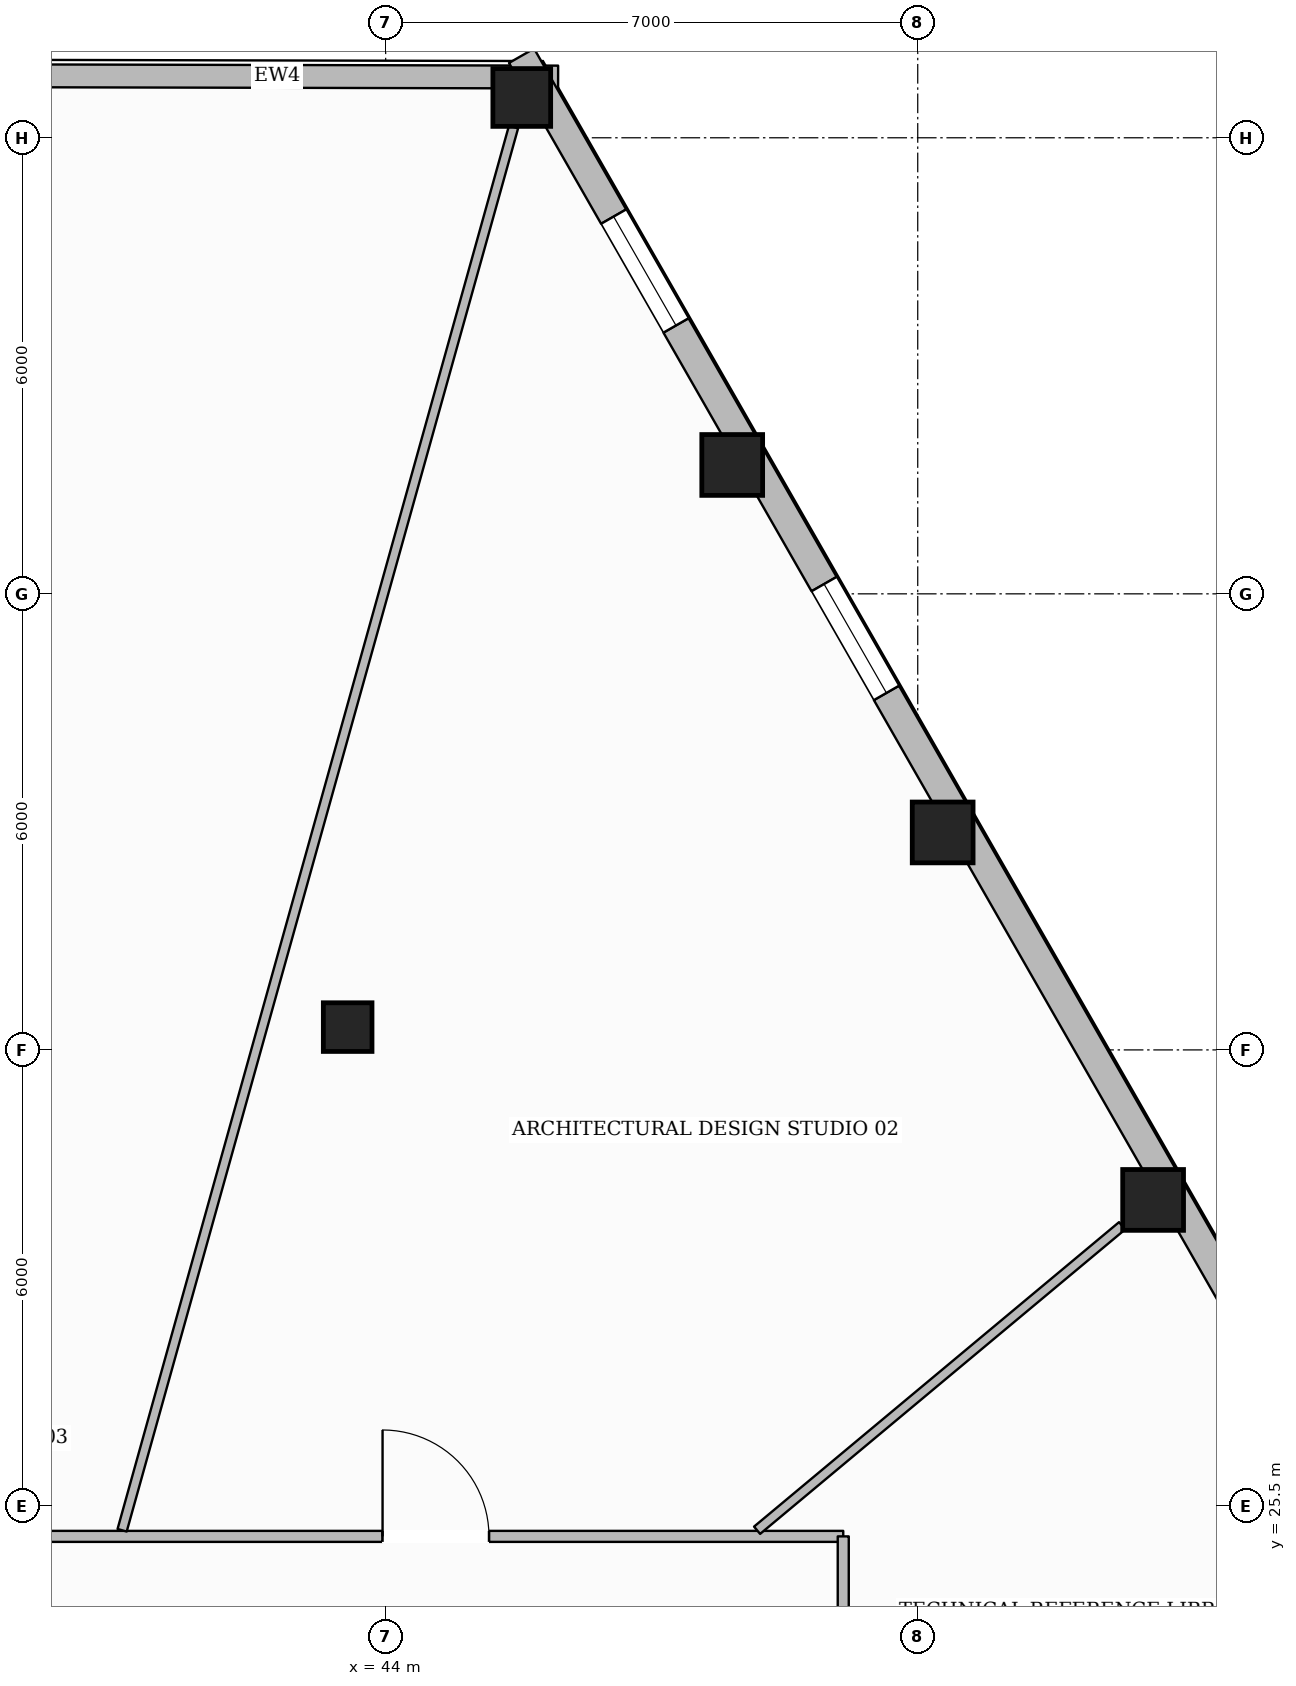
"""IFC4 building model, lengths in metres.
Left out: names, types, materials, properties, quantities, classifications, styles, units other than length and angle.
Written with IfcOpenShell. Run it as: python <this file> out.ifc"""

import sys

from ifc_helpers import new_model, si_unit, direction, frame, frame_2d, origin, origin_2d, place, context, subcontext, project, spatial, rectangle, hollow_rectangle, extrude, element, fill, save


model = new_model("IFC4")
c1 = context("Model", 3, precision=1e-05, world=origin(), true_north=direction((0.0, 1.0)))
c2 = subcontext(c1, "Body", "Model", "MODEL_VIEW")
j1 = project(units=[si_unit("LENGTHUNIT", "METRE"), si_unit("PLANEANGLEUNIT", "RADIAN")], contexts=[c1])
p1 = place(None, origin())
s1 = spatial("IfcSite", under=j1, at=p1, CompositionType="ELEMENT")
p2 = place(p1, origin())
s2 = spatial("IfcBuilding", under=s1, at=p2, CompositionType="ELEMENT")
p3 = place(p2, frame((0.0, 0.0, 32.95)))
s3 = spatial("IfcBuildingStorey", under=s2, at=p3, CompositionType="ELEMENT", Elevation=32.95)
for number, where, z_axis, x_axis in (
    (1, (54.097, 29.526, 0.0), (0.0, 0.0, 1.0), (1.0, 0.0, 0.0)),
    (2, (51.328, 34.361, 0.0), (0.0, 0.0, 1.0), (1.0, 0.0, 0.0)),
    (3, (48.559, 39.196, 0.0), (0.0, 0.0, 1.0), (1.0, 0.0, 0.0)),
):
    element("IfcColumn", number, at=place(p3, frame(where, z_axis=z_axis, x_axis=x_axis)), inside=s3, PredefinedType="COLUMN", context=c2, shape_type="SweptSolid", body=[
        extrude(hollow_rectangle(XDim=0.8, YDim=0.8, WallThickness=0.036, at=origin_2d()), origin(), (0.0, 0.0, 1.0), 3.59),
    ])
p4 = place(p3, frame((45.791, 44.03, 0.0), z_axis=(0.0, 0.0, 1.0), x_axis=(1.0, 0.0, 0.0)))
e4 = element("IfcColumn", 4, at=p4, inside=s3, PredefinedType="COLUMN", context=c2, shape_type="SweptSolid", body=[
    extrude(hollow_rectangle(XDim=0.76, YDim=0.76, WallThickness=0.035, at=origin_2d()), origin(), (0.0, 0.0, 1.0), 3.59),
])
p5 = place(p3, frame((43.5, 31.8, 0.0), z_axis=(0.0, 0.0, 1.0), x_axis=(1.0, 0.0, 0.0)))
e5 = element("IfcColumn", 5, at=p5, inside=s3, PredefinedType="COLUMN", context=c2, shape_type="SweptSolid", body=[
    extrude(hollow_rectangle(XDim=0.64, YDim=0.64, WallThickness=0.028, at=origin_2d()), origin(), (0.0, 0.0, 1.0), 3.59),
])
p6 = place(p3, frame((29.792, 44.336, 0.0), z_axis=(0.0, 0.0, 1.0), x_axis=(0.999997529995, -0.002222611864, 0.0)))
e6 = element("IfcWall", 6, at=p6, inside=s3, PredefinedType="STANDARD", context=c2, shape_type="SweptSolid", body=[
    extrude(rectangle(XDim=16.477, YDim=0.3, at=frame_2d((8.238, 0.0))), origin(), (0.0, 0.0, 1.0), 2.97),
])
p7 = place(p6, frame((7.638, 0.0, 0.65)))
e7 = element("IfcOpeningElement", 7, at=p7, cuts=e6, PredefinedType="OPENING", context=c2, shape_type="SweptSolid", body=[
    extrude(rectangle(XDim=1.2, YDim=1.7, at=frame_2d((0.6, 0.85))), frame((0.0, 0.16, 0.0), z_axis=(0.0, -1.0, 0.0), x_axis=(1.0, 0.0, 0.0)), (0.0, 0.0, 1.0), 0.32),
])
p8 = place(p3, frame((45.788, 44.579, 0.0), z_axis=(0.0, 0.0, 1.0), x_axis=(0.49695855075, -0.867774278736, 0.0)))
e8 = element("IfcWall", 8, at=p8, inside=s3, PredefinedType="STANDARD", context=c2, shape_type="SweptSolid", body=[
    extrude(rectangle(XDim=34.379, YDim=0.38, at=frame_2d((17.189, 0.0))), origin(), (0.0, 0.0, 1.0), 2.97),
])
p9 = place(p8, frame((25.184, 0.0, 0.0)))
e9 = element("IfcOpeningElement", 9, at=p9, cuts=e8, PredefinedType="OPENING", context=c2, shape_type="SweptSolid", body=[
    extrude(rectangle(XDim=1.0, YDim=2.2, at=frame_2d((0.5, 1.1))), frame((0.0, 0.2, 0.0), z_axis=(0.0, -1.0, 0.0), x_axis=(1.0, 0.0, 0.0)), (0.0, 0.0, 1.0), 0.4),
])
p10 = place(p8, frame((30.294, 0.0, 0.65)))
e10 = element("IfcOpeningElement", 10, at=p10, cuts=e8, PredefinedType="OPENING", context=c2, shape_type="SweptSolid", body=[
    extrude(rectangle(XDim=1.65, YDim=1.75, at=frame_2d((0.825, 0.875))), frame((0.0, 0.2, 0.0), z_axis=(0.0, -1.0, 0.0), x_axis=(1.0, 0.0, 0.0)), (0.0, 0.0, 1.0), 0.4),
])
p11 = place(p8, frame((19.152, 0.0, 0.65)))
e11 = element("IfcOpeningElement", 11, at=p11, cuts=e8, PredefinedType="OPENING", context=c2, shape_type="SweptSolid", body=[
    extrude(rectangle(XDim=1.65, YDim=1.75, at=frame_2d((0.825, 0.875))), frame((0.0, 0.2, 0.0), z_axis=(0.0, -1.0, 0.0), x_axis=(1.0, 0.0, 0.0)), (0.0, 0.0, 1.0), 0.4),
])
p12 = place(p8, frame((8.01, 0.0, 0.65)))
e12 = element("IfcOpeningElement", 12, at=p12, cuts=e8, PredefinedType="OPENING", context=c2, shape_type="SweptSolid", body=[
    extrude(rectangle(XDim=1.65, YDim=1.75, at=frame_2d((0.825, 0.875))), frame((0.0, 0.2, 0.0), z_axis=(0.0, -1.0, 0.0), x_axis=(1.0, 0.0, 0.0)), (0.0, 0.0, 1.0), 0.4),
])
p13 = place(p8, frame((2.438, 0.0, 0.65)))
e13 = element("IfcOpeningElement", 13, at=p13, cuts=e8, PredefinedType="OPENING", context=c2, shape_type="SweptSolid", body=[
    extrude(rectangle(XDim=1.65, YDim=1.75, at=frame_2d((0.825, 0.875))), frame((0.0, 0.2, 0.0), z_axis=(0.0, -1.0, 0.0), x_axis=(1.0, 0.0, 0.0)), (0.0, 0.0, 1.0), 0.4),
])
p14 = place(p3, frame((39.0, 25.1, 0.0), z_axis=(0.0, 0.0, 1.0), x_axis=(1.0, 0.0, 0.0)))
e14 = element("IfcWall", 14, at=p14, inside=s3, PredefinedType="PARTITIONING", context=c2, shape_type="SweptSolid", body=[
    extrude(rectangle(XDim=11.02, YDim=0.145, at=frame_2d((5.51, 0.0))), origin(), (0.0, 0.0, 1.0), 3.59),
])
p15 = place(p14, frame((4.959, 0.0, 0.0)))
e15 = element("IfcOpeningElement", 15, at=p15, cuts=e14, PredefinedType="OPENING", context=c2, shape_type="SweptSolid", body=[
    extrude(rectangle(XDim=1.4, YDim=2.2, at=frame_2d((0.7, 1.1))), frame((0.0, 0.083, 0.0), z_axis=(0.0, -1.0, 0.0), x_axis=(1.0, 0.0, 0.0)), (0.0, 0.0, 1.0), 0.165),
])
p16 = place(p3, frame((50.02, 25.1, 0.0), z_axis=(0.0, 0.0, 1.0), x_axis=(0.0, -1.0, 0.0)))
e16 = element("IfcWall", 16, at=p16, inside=s3, PredefinedType="PARTITIONING", context=c2, shape_type="SweptSolid", body=[
    extrude(rectangle(XDim=16.0, YDim=0.145, at=frame_2d((8.0, 0.0))), origin(), (0.0, 0.0, 1.0), 3.278),
])
p17 = place(p16, frame((2.834, 0.0, 0.0)))
e17 = element("IfcOpeningElement", 17, at=p17, cuts=e16, PredefinedType="OPENING", context=c2, shape_type="SweptSolid", body=[
    extrude(rectangle(XDim=1.4, YDim=2.2, at=frame_2d((0.7, 1.1))), frame((0.0, 0.083, 0.0), z_axis=(0.0, -1.0, 0.0), x_axis=(1.0, 0.0, 0.0)), (0.0, 0.0, 1.0), 0.165),
])
p18 = place(p16, frame((8.983, 0.0, 0.0)))
e18 = element("IfcOpeningElement", 18, at=p18, cuts=e16, PredefinedType="OPENING", context=c2, shape_type="SweptSolid", body=[
    extrude(rectangle(XDim=1.4, YDim=2.2, at=frame_2d((0.7, 1.1))), frame((0.0, 0.083, 0.0), z_axis=(0.0, -1.0, 0.0), x_axis=(1.0, 0.0, 0.0)), (0.0, 0.0, 1.0), 0.165),
])
p19 = place(p3, frame((48.886, 25.18, 0.0), z_axis=(0.0, 0.0, 1.0), x_axis=(0.767926794533, 0.640537616568, 0.0)))
e19 = element("IfcWall", 19, at=p19, inside=s3, PredefinedType="PARTITIONING", context=c2, shape_type="SweptSolid", body=[
    extrude(rectangle(XDim=6.253, YDim=0.125, at=frame_2d((3.127, 0.0))), origin(), (0.0, 0.0, 1.0), 3.057),
])
p20 = place(p3, frame((40.533, 25.18, 0.0), z_axis=(0.0, 0.0, 1.0), x_axis=(0.26868106489, 0.963229196697, 0.0)))
e20 = element("IfcWall", 20, at=p20, inside=s3, PredefinedType="PARTITIONING", context=c2, shape_type="SweptSolid", body=[
    extrude(rectangle(XDim=19.167, YDim=0.125, at=frame_2d((9.583, 0.0))), origin(), (0.0, 0.0, 1.0), 3.59),
])
p21 = place(p12, origin())
e21 = element("IfcWindow", 21, at=p21, inside=s3, PartitioningType="SINGLE_PANEL", PredefinedType="WINDOW", context=c2, shape_type="SweptSolid", body=[
    extrude(rectangle(XDim=1.65, YDim=1.75, at=frame_2d((0.825, 0.875))), frame((0.0, 0.03, 0.0), z_axis=(0.0, -1.0, 0.0), x_axis=(1.0, 0.0, 0.0)), (0.0, 0.0, 1.0), 0.06),
])
fill(e12, e21)
p22 = place(p13, origin())
e22 = element("IfcWindow", 22, at=p22, inside=s3, PartitioningType="SINGLE_PANEL", PredefinedType="WINDOW", context=c2, shape_type="SweptSolid", body=[
    extrude(rectangle(XDim=1.65, YDim=1.75, at=frame_2d((0.825, 0.875))), frame((0.0, 0.03, 0.0), z_axis=(0.0, -1.0, 0.0), x_axis=(1.0, 0.0, 0.0)), (0.0, 0.0, 1.0), 0.06),
])
fill(e13, e22)
p23 = place(p15, origin())
e23 = element("IfcDoor", 23, at=p23, inside=s3, OperationType="SINGLE_SWING_LEFT", PredefinedType="DOOR", context=c2, shape_type="SweptSolid", body=[
    extrude(rectangle(XDim=1.4, YDim=2.2, at=frame_2d((0.7, 1.1))), frame((0.0, 0.025, 0.0), z_axis=(0.0, -1.0, 0.0), x_axis=(1.0, 0.0, 0.0)), (0.0, 0.0, 1.0), 0.05),
])
fill(e15, e23)
save(model, sys.argv[1])
